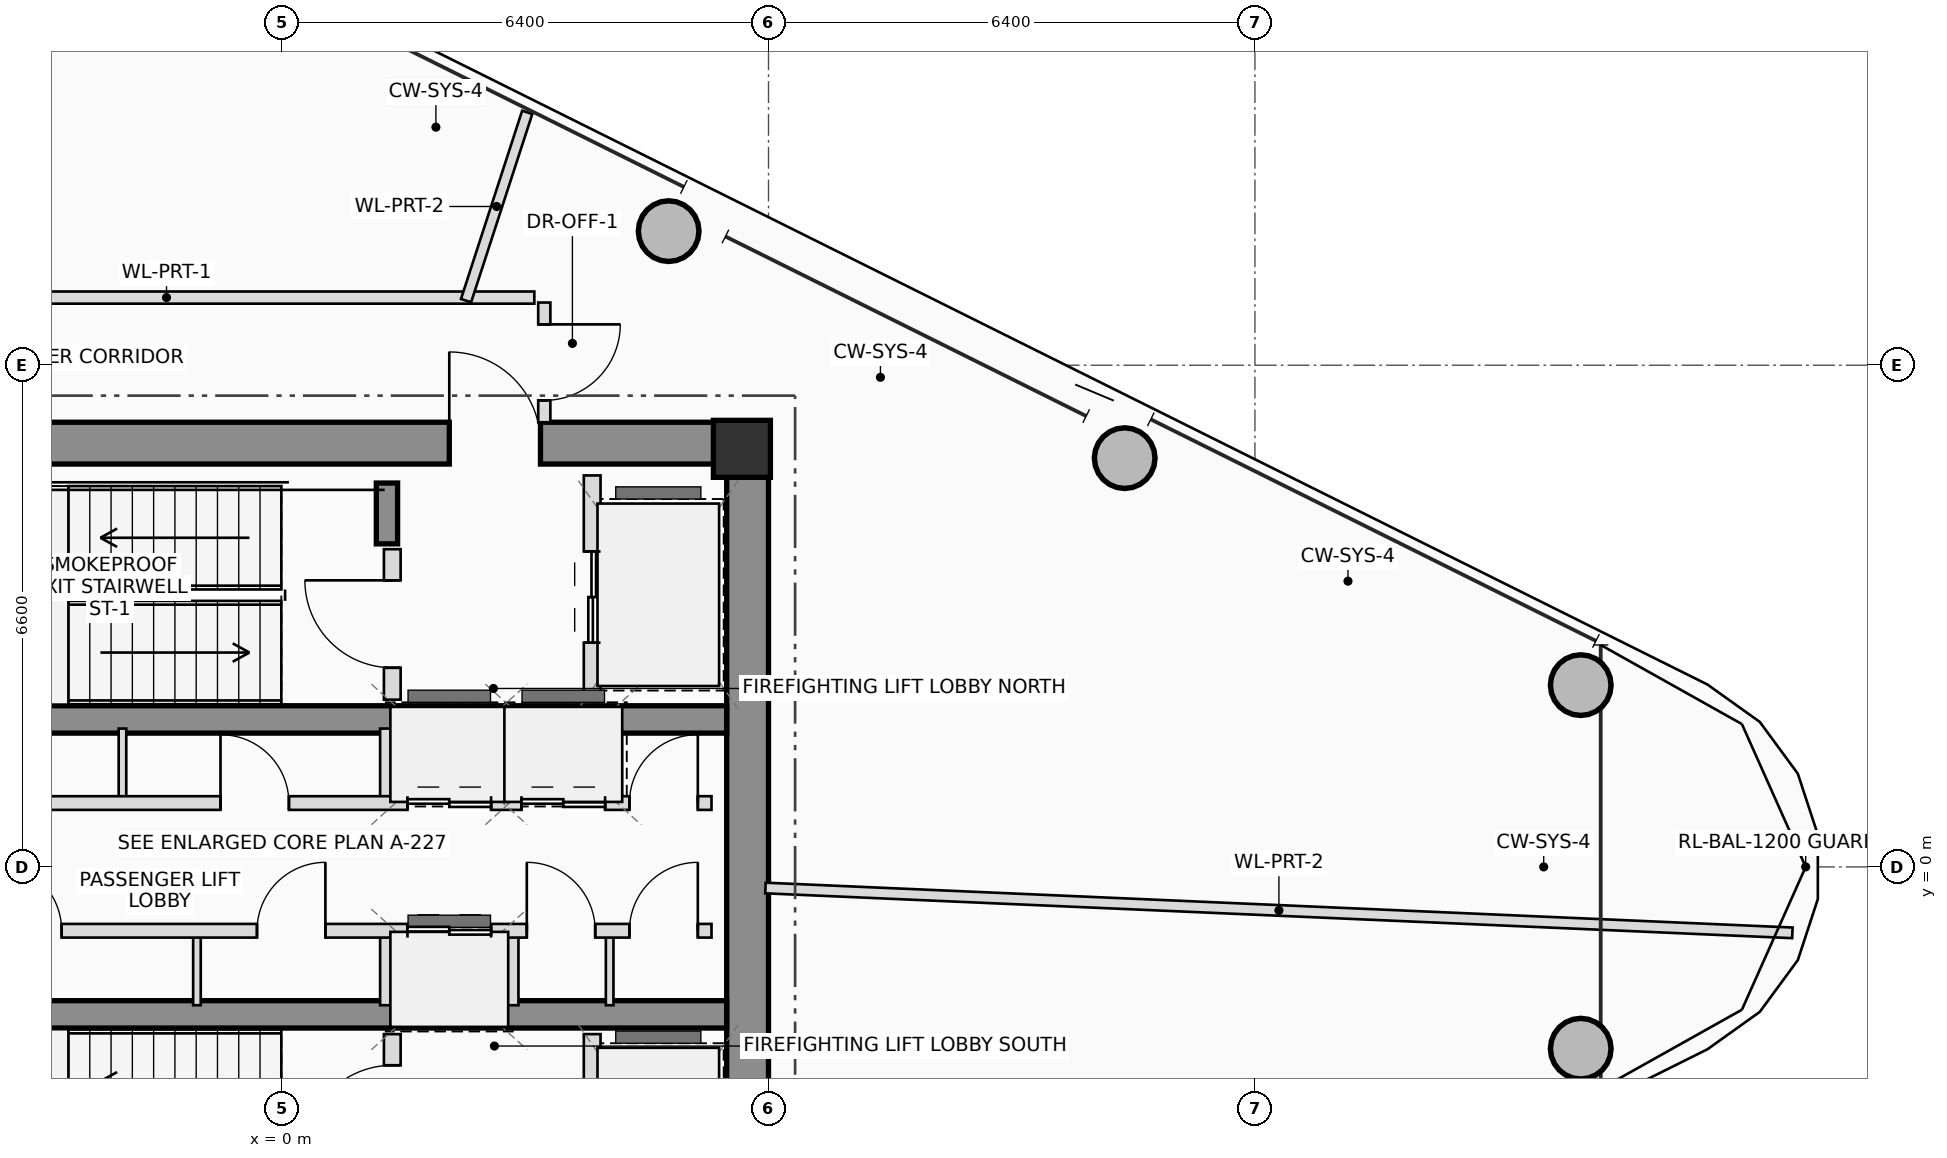
"""IFC4 building model, lengths in metres.
Left out: names, types, materials, properties, quantities, classifications, styles, units other than length and angle.
Written with IfcOpenShell. Run it as: python <this file> out.ifc"""

import sys

from ifc_helpers import new_model, si_unit, direction, frame, frame_2d, origin, origin_2d, place, context, subcontext, project, spatial, rectangle, hollow_circle, extrude, source, transform, mapped, element, fill, save


model = new_model("IFC4")
c1 = context("Model", 3, precision=1e-05, world=origin(), true_north=direction((0.0, 1.0)))
c2 = subcontext(c1, "Body", "Model", "MODEL_VIEW")
j1 = project(units=[si_unit("LENGTHUNIT", "METRE"), si_unit("PLANEANGLEUNIT", "RADIAN")], contexts=[c1])
p1 = place(None, origin())
s1 = spatial("IfcSite", under=j1, at=p1, CompositionType="ELEMENT")
p2 = place(p1, origin())
s2 = spatial("IfcBuilding", under=s1, at=p2, CompositionType="ELEMENT")
p3 = place(p2, frame((0.0, 0.0, 296.75)))
s3 = spatial("IfcBuildingStorey", under=s2, at=p3, CompositionType="ELEMENT", Elevation=296.75)
m1 = source(origin(), c2, "Body", "SweptSolid", [
    extrude(rectangle(XDim=0.75, YDim=0.75, at=origin_2d()), origin(), (0.0, 0.0, 1.0), 3.45),
])
p4 = place(p3, frame((6.05, 5.5, 0.0), z_axis=(0.0, 0.0, 1.0), x_axis=(1.0, 0.0, 0.0)))
e1 = element("IfcColumn", 1, at=p4, inside=s3, PredefinedType="COLUMN", context=c2, shape_type="MappedRepresentation", body=[
    mapped(m1, transform((0.0, 0.0, 0.0), scale=1.0)),
])
p5 = place(p3, frame((-6.4, 5.575, 0.0), z_axis=(0.0, 0.0, 1.0), x_axis=(1.0, 0.0, 0.0)))
e2 = element("IfcWall", 2, at=p5, inside=s3, PredefinedType="SHEAR", context=c2, shape_type="SweptSolid", body=[
    extrude(rectangle(XDim=12.8, YDim=0.55, at=frame_2d((6.4, 0.0))), origin(), (0.0, 0.0, 1.0), 3.45),
])
p6 = place(p5, frame((8.6, 0.0, 0.0)))
e3 = element("IfcOpeningElement", 3, at=p6, cuts=e2, PredefinedType="OPENING", context=c2, shape_type="SweptSolid", body=[
    extrude(rectangle(XDim=1.2, YDim=2.2, at=frame_2d((0.6, 1.1))), frame((0.0, 0.285, 0.0), z_axis=(0.0, -1.0, 0.0), x_axis=(1.0, 0.0, 0.0)), (0.0, 0.0, 1.0), 0.57),
])
p7 = place(p3, frame((6.125, -5.3, 0.0), z_axis=(0.0, 0.0, 1.0), x_axis=(0.0, 1.0, 0.0)))
e4 = element("IfcWall", 4, at=p7, inside=s3, PredefinedType="SHEAR", context=c2, shape_type="SweptSolid", body=[
    extrude(rectangle(XDim=10.6, YDim=0.55, at=frame_2d((5.3, 0.0))), origin(), (0.0, 0.0, 1.0), 3.45),
])
for number, where, z_axis, x_axis in (
    (5, (-5.85, 1.94, 0.0), (0.0, 0.0, 1.0), (1.0, 0.0, 0.0)),
    (6, (-5.85, -1.94, 0.0), (0.0, 0.0, 1.0), (1.0, 0.0, 0.0)),
):
    element("IfcWall", number, at=place(p3, frame(where, z_axis=z_axis, x_axis=x_axis)), inside=s3, PredefinedType="SHEAR", context=c2, shape_type="SweptSolid", body=[
        extrude(rectangle(XDim=11.7, YDim=0.36, at=frame_2d((5.85, 0.0))), origin(), (0.0, 0.0, 1.0), 3.45),
    ])
p8 = place(p3, frame((1.38, 4.25, 0.0), z_axis=(0.0, 0.0, 1.0), x_axis=(0.0, 1.0, 0.0)))
e7 = element("IfcWall", 7, at=p8, inside=s3, PredefinedType="SHEAR", context=c2, shape_type="SweptSolid", body=[
    extrude(rectangle(XDim=0.8, YDim=0.28, at=frame_2d((0.4, 0.0))), origin(), (0.0, 0.0, 1.0), 3.45),
])
m2 = source(origin(), c2, "Body", "SweptSolid", [
    extrude(hollow_circle(Radius=0.4, WallThickness=0.028, at=origin_2d()), origin(), (0.0, 0.0, 1.0), 3.45),
])
for number, where, z_axis, x_axis in (
    (8, (17.087, -2.392, 0.0), (0.0, 0.0, 1.0), (1.0, 0.0, 0.0)),
    (9, (17.087, 2.392, 0.0), (0.0, 0.0, 1.0), (1.0, 0.0, 0.0)),
    (10, (11.086, 5.378, 0.0), (0.0, 0.0, 1.0), (1.0, 0.0, 0.0)),
    (11, (5.086, 8.364, 0.0), (0.0, 0.0, 1.0), (1.0, 0.0, 0.0)),
):
    element("IfcColumn", number, at=place(p3, frame(where, z_axis=z_axis, x_axis=x_axis)), inside=s3, PredefinedType="COLUMN", context=c2, shape_type="MappedRepresentation", body=[
        mapped(m2, transform((0.0, 0.0, 0.0), scale=1.0)),
    ])
p9 = place(p3, frame((1.45, 2.2, 0.0), z_axis=(0.0, 0.0, 1.0), x_axis=(0.0, 1.0, 0.0)))
e12 = element("IfcWall", 12, at=p9, inside=s3, PredefinedType="PLUMBINGWALL", context=c2, shape_type="SweptSolid", body=[
    extrude(rectangle(XDim=1.98, YDim=0.22, at=frame_2d((0.99, 0.0))), origin(), (0.0, 0.0, 1.0), 3.25),
])
p10 = place(p9, frame((0.42, 0.0, 0.0)))
e13 = element("IfcOpeningElement", 13, at=p10, cuts=e12, PredefinedType="OPENING", context=c2, shape_type="SweptSolid", body=[
    extrude(rectangle(XDim=1.15, YDim=2.15, at=frame_2d((0.575, 1.075))), frame((0.0, 0.12, 0.0), z_axis=(0.0, -1.0, 0.0), x_axis=(1.0, 0.0, 0.0)), (0.0, 0.0, 1.0), 0.24),
])
p11 = place(p3, frame((4.08, 2.2, 0.0), z_axis=(0.0, 0.0, 1.0), x_axis=(0.0, 1.0, 0.0)))
e14 = element("IfcWall", 14, at=p11, inside=s3, PredefinedType="PLUMBINGWALL", context=c2, shape_type="SweptSolid", body=[
    extrude(rectangle(XDim=2.95, YDim=0.22, at=frame_2d((1.475, 0.0))), origin(), (0.0, 0.0, 1.0), 3.25),
])
p12 = place(p11, frame((0.75, 0.0, 0.0)))
e15 = element("IfcOpeningElement", 15, at=p12, cuts=e14, PredefinedType="OPENING", context=c2, shape_type="SweptSolid", body=[
    extrude(rectangle(XDim=1.2, YDim=2.25, at=frame_2d((0.6, 1.125))), frame((0.0, 0.12, 0.0), z_axis=(0.0, -1.0, 0.0), x_axis=(1.0, 0.0, 0.0)), (0.0, 0.0, 1.0), 0.24),
])
p13 = place(p3, frame((1.45, -4.18, 0.0), z_axis=(0.0, 0.0, 1.0), x_axis=(0.0, 1.0, 0.0)))
e16 = element("IfcWall", 16, at=p13, inside=s3, PredefinedType="PLUMBINGWALL", context=c2, shape_type="SweptSolid", body=[
    extrude(rectangle(XDim=1.98, YDim=0.22, at=frame_2d((0.99, 0.0))), origin(), (0.0, 0.0, 1.0), 3.25),
])
p14 = place(p13, frame((0.42, 0.0, 0.0)))
e17 = element("IfcOpeningElement", 17, at=p14, cuts=e16, PredefinedType="OPENING", context=c2, shape_type="SweptSolid", body=[
    extrude(rectangle(XDim=1.15, YDim=2.15, at=frame_2d((0.575, 1.075))), frame((0.0, 0.12, 0.0), z_axis=(0.0, -1.0, 0.0), x_axis=(1.0, 0.0, 0.0)), (0.0, 0.0, 1.0), 0.24),
])
p15 = place(p3, frame((4.08, -5.15, 0.0), z_axis=(0.0, 0.0, 1.0), x_axis=(0.0, 1.0, 0.0)))
e18 = element("IfcWall", 18, at=p15, inside=s3, PredefinedType="PLUMBINGWALL", context=c2, shape_type="SweptSolid", body=[
    extrude(rectangle(XDim=2.95, YDim=0.22, at=frame_2d((1.475, 0.0))), origin(), (0.0, 0.0, 1.0), 3.25),
])
p16 = place(p15, frame((0.95, 0.0, 0.0)))
e19 = element("IfcOpeningElement", 19, at=p16, cuts=e18, PredefinedType="OPENING", context=c2, shape_type="SweptSolid", body=[
    extrude(rectangle(XDim=1.2, YDim=2.25, at=frame_2d((0.6, 1.125))), frame((0.0, 0.12, 0.0), z_axis=(0.0, -1.0, 0.0), x_axis=(1.0, 0.0, 0.0)), (0.0, 0.0, 1.0), 0.24),
])
for number, where, z_axis, x_axis in (
    (20, (-2.1, 0.84, 0.0), (0.0, 0.0, 1.0), (0.0, 1.0, 0.0)),
    (21, (-1.12, -1.82, 0.0), (0.0, 0.0, 1.0), (0.0, 1.0, 0.0)),
):
    element("IfcWall", number, at=place(p3, frame(where, z_axis=z_axis, x_axis=x_axis)), inside=s3, PredefinedType="PARTITIONING", context=c2, shape_type="SweptSolid", body=[
        extrude(rectangle(XDim=0.98, YDim=0.1, at=frame_2d((0.49, 0.0))), origin(), (0.0, 0.0, 1.0), 3.25),
    ])
for number, where, z_axis, x_axis in (
    (22, (1.38, 0.84, 0.0), (0.0, 0.0, 1.0), (0.0, 1.0, 0.0)),
    (23, (1.38, -1.82, 0.0), (0.0, 0.0, 1.0), (0.0, 1.0, 0.0)),
    (24, (3.02, 0.84, 0.0), (0.0, 0.0, 1.0), (0.0, 1.0, 0.0)),
    (25, (4.38, 0.84, 0.0), (0.0, 0.0, 1.0), (0.0, 1.0, 0.0)),
    (26, (3.02, -1.82, 0.0), (0.0, 0.0, 1.0), (0.0, 1.0, 0.0)),
):
    element("IfcWall", number, at=place(p3, frame(where, z_axis=z_axis, x_axis=x_axis)), inside=s3, PredefinedType="PLUMBINGWALL", context=c2, shape_type="SweptSolid", body=[
        extrude(rectangle(XDim=0.98, YDim=0.18, at=frame_2d((0.49, 0.0))), origin(), (0.0, 0.0, 1.0), 3.25),
    ])
p17 = place(p3, frame((4.31, -1.82, 0.0), z_axis=(0.0, 0.0, 1.0), x_axis=(0.0, 1.0, 0.0)))
e27 = element("IfcWall", 27, at=p17, inside=s3, PredefinedType="PARTITIONING", context=c2, shape_type="SweptSolid", body=[
    extrude(rectangle(XDim=0.98, YDim=0.1, at=frame_2d((0.49, 0.0))), origin(), (0.0, 0.0, 1.0), 3.25),
])
p18 = place(p3, frame((-5.68, 0.84, 0.0), z_axis=(0.0, 0.0, 1.0), x_axis=(1.0, 0.0, 0.0)))
e28 = element("IfcWall", 28, at=p18, inside=s3, PredefinedType="PLUMBINGWALL", context=c2, shape_type="SweptSolid", body=[
    extrude(rectangle(XDim=11.33, YDim=0.18, at=frame_2d((5.665, 0.0))), origin(), (0.0, 0.0, 1.0), 3.25),
])
p19 = place(p18, frame((1.39, 0.0, 0.0)))
e29 = element("IfcOpeningElement", 29, at=p19, cuts=e28, PredefinedType="OPENING", context=c2, shape_type="SweptSolid", body=[
    extrude(rectangle(XDim=0.92, YDim=2.1, at=frame_2d((0.46, 1.05))), frame((0.0, 0.1, 0.0), z_axis=(0.0, -1.0, 0.0), x_axis=(1.0, 0.0, 0.0)), (0.0, 0.0, 1.0), 0.2),
])
p20 = place(p18, frame((4.87, 0.0, 0.0)))
e30 = element("IfcOpeningElement", 30, at=p20, cuts=e28, PredefinedType="OPENING", context=c2, shape_type="SweptSolid", body=[
    extrude(rectangle(XDim=0.9, YDim=2.05, at=frame_2d((0.45, 1.025))), frame((0.0, 0.1, 0.0), z_axis=(0.0, -1.0, 0.0), x_axis=(1.0, 0.0, 0.0)), (0.0, 0.0, 1.0), 0.2),
])
p21 = place(p18, frame((7.33, 0.0, 0.0)))
e31 = element("IfcOpeningElement", 31, at=p21, cuts=e28, PredefinedType="OPENING", context=c2, shape_type="SweptSolid", body=[
    extrude(rectangle(XDim=1.1, YDim=2.2, at=frame_2d((0.55, 1.1))), frame((0.0, 0.1, 0.0), z_axis=(0.0, -1.0, 0.0), x_axis=(1.0, 0.0, 0.0)), (0.0, 0.0, 1.0), 0.2),
])
p22 = place(p18, frame((8.83, 0.0, 0.0)))
e32 = element("IfcOpeningElement", 32, at=p22, cuts=e28, PredefinedType="OPENING", context=c2, shape_type="SweptSolid", body=[
    extrude(rectangle(XDim=1.1, YDim=2.2, at=frame_2d((0.55, 1.1))), frame((0.0, 0.1, 0.0), z_axis=(0.0, -1.0, 0.0), x_axis=(1.0, 0.0, 0.0)), (0.0, 0.0, 1.0), 0.2),
])
p23 = place(p18, frame((10.25, 0.0, 0.0)))
e33 = element("IfcOpeningElement", 33, at=p23, cuts=e28, PredefinedType="OPENING", context=c2, shape_type="SweptSolid", body=[
    extrude(rectangle(XDim=0.9, YDim=2.05, at=frame_2d((0.45, 1.025))), frame((0.0, 0.1, 0.0), z_axis=(0.0, -1.0, 0.0), x_axis=(1.0, 0.0, 0.0)), (0.0, 0.0, 1.0), 0.2),
])
p24 = place(p3, frame((-5.68, -0.84, 0.0), z_axis=(0.0, 0.0, 1.0), x_axis=(1.0, 0.0, 0.0)))
e34 = element("IfcWall", 34, at=p24, inside=s3, PredefinedType="PLUMBINGWALL", context=c2, shape_type="SweptSolid", body=[
    extrude(rectangle(XDim=11.33, YDim=0.18, at=frame_2d((5.665, 0.0))), origin(), (0.0, 0.0, 1.0), 3.25),
])
p25 = place(p24, frame((1.88, 0.0, 0.0)))
e35 = element("IfcOpeningElement", 35, at=p25, cuts=e34, PredefinedType="OPENING", context=c2, shape_type="SweptSolid", body=[
    extrude(rectangle(XDim=0.9, YDim=2.05, at=frame_2d((0.45, 1.025))), frame((0.0, 0.1, 0.0), z_axis=(0.0, -1.0, 0.0), x_axis=(1.0, 0.0, 0.0)), (0.0, 0.0, 1.0), 0.2),
])
p26 = place(p24, frame((5.35, 0.0, 0.0)))
e36 = element("IfcOpeningElement", 36, at=p26, cuts=e34, PredefinedType="OPENING", context=c2, shape_type="SweptSolid", body=[
    extrude(rectangle(XDim=0.9, YDim=2.05, at=frame_2d((0.45, 1.025))), frame((0.0, 0.1, 0.0), z_axis=(0.0, -1.0, 0.0), x_axis=(1.0, 0.0, 0.0)), (0.0, 0.0, 1.0), 0.2),
])
p27 = place(p24, frame((7.33, 0.0, 0.0)))
e37 = element("IfcOpeningElement", 37, at=p27, cuts=e34, PredefinedType="OPENING", context=c2, shape_type="SweptSolid", body=[
    extrude(rectangle(XDim=1.1, YDim=2.2, at=frame_2d((0.55, 1.1))), frame((0.0, 0.1, 0.0), z_axis=(0.0, -1.0, 0.0), x_axis=(1.0, 0.0, 0.0)), (0.0, 0.0, 1.0), 0.2),
])
p28 = place(p24, frame((8.9, 0.0, 0.0)))
e38 = element("IfcOpeningElement", 38, at=p28, cuts=e34, PredefinedType="OPENING", context=c2, shape_type="SweptSolid", body=[
    extrude(rectangle(XDim=0.9, YDim=2.05, at=frame_2d((0.45, 1.025))), frame((0.0, 0.1, 0.0), z_axis=(0.0, -1.0, 0.0), x_axis=(1.0, 0.0, 0.0)), (0.0, 0.0, 1.0), 0.2),
])
p29 = place(p24, frame((10.25, 0.0, 0.0)))
e39 = element("IfcOpeningElement", 39, at=p29, cuts=e34, PredefinedType="OPENING", context=c2, shape_type="SweptSolid", body=[
    extrude(rectangle(XDim=0.9, YDim=2.05, at=frame_2d((0.45, 1.025))), frame((0.0, 0.1, 0.0), z_axis=(0.0, -1.0, 0.0), x_axis=(1.0, 0.0, 0.0)), (0.0, 0.0, 1.0), 0.2),
])
p30 = place(p3, frame((-6.36, 7.49, 0.0), z_axis=(0.0, 0.0, 1.0), x_axis=(1.0, 0.0, 0.0)))
e40 = element("IfcWall", 40, at=p30, inside=s3, PredefinedType="PARTITIONING", context=c2, shape_type="SweptSolid", body=[
    extrude(rectangle(XDim=9.679, YDim=0.16, at=frame_2d((4.84, 0.0))), origin(), (0.0, 0.0, 1.0), 2.655),
])
p31 = place(p3, frame((3.45, 7.425, 0.0), z_axis=(0.0, 0.0, 1.0), x_axis=(0.0, -1.0, 0.0)))
e41 = element("IfcWall", 41, at=p31, inside=s3, PredefinedType="PARTITIONING", context=c2, shape_type="SweptSolid", body=[
    extrude(rectangle(XDim=1.575, YDim=0.16, at=frame_2d((0.787, 0.0))), origin(), (0.0, 0.0, 1.0), 2.855),
])
p32 = place(p31, frame((0.287, 0.0, 0.0)))
e42 = element("IfcOpeningElement", 42, at=p32, cuts=e41, PredefinedType="OPENING", context=c2, shape_type="SweptSolid", body=[
    extrude(rectangle(XDim=1.0, YDim=2.25, at=frame_2d((0.5, 1.125))), frame((0.0, 0.09, 0.0), z_axis=(0.0, -1.0, 0.0), x_axis=(1.0, 0.0, 0.0)), (0.0, 0.0, 1.0), 0.18),
])
p33 = place(p3, frame((6.36, -0.278, 0.0), z_axis=(0.0, 0.0, 1.0), x_axis=(0.999047623791, -0.043633076864, 0.0)))
e43 = element("IfcWall", 43, at=p33, inside=s3, PredefinedType="PARTITIONING", context=c2, shape_type="SweptSolid", body=[
    extrude(rectangle(XDim=13.524, YDim=0.14, at=frame_2d((6.762, 0.0))), origin(), (0.0, 0.0, 1.0), 2.815),
])
p34 = place(p3, frame((2.421, 7.45, 0.0), z_axis=(0.0, 0.0, 1.0), x_axis=(0.309047920595, 0.951046467201, 0.0)))
e44 = element("IfcWall", 44, at=p34, inside=s3, PredefinedType="PARTITIONING", context=c2, shape_type="SweptSolid", body=[
    extrude(rectangle(XDim=2.604, YDim=0.14, at=frame_2d((1.302, 0.0))), origin(), (0.0, 0.0, 1.0), 2.815),
])
p35 = place(p6, origin())
e45 = element("IfcDoor", 45, at=p35, inside=s3, OperationType="SINGLE_SWING_LEFT", PredefinedType="DOOR", context=c2, shape_type="SweptSolid", body=[
    extrude(rectangle(XDim=1.2, YDim=2.2, at=frame_2d((0.6, 1.1))), frame((0.0, 0.025, 0.0), z_axis=(0.0, -1.0, 0.0), x_axis=(1.0, 0.0, 0.0)), (0.0, 0.0, 1.0), 0.05),
])
fill(e3, e45)
p36 = place(p10, origin())
e46 = element("IfcDoor", 46, at=p36, inside=s3, OperationType="SINGLE_SWING_RIGHT", PredefinedType="DOOR", context=c2, shape_type="SweptSolid", body=[
    extrude(rectangle(XDim=1.15, YDim=2.15, at=frame_2d((0.575, 1.075))), frame((0.0, 0.025, 0.0), z_axis=(0.0, -1.0, 0.0), x_axis=(1.0, 0.0, 0.0)), (0.0, 0.0, 1.0), 0.05),
])
fill(e13, e46)
p37 = place(p12, origin())
e47 = element("IfcDoor", 47, at=p37, inside=s3, OperationType="DOUBLE_DOOR_SLIDING", PredefinedType="DOOR", context=c2, shape_type="SweptSolid", body=[
    extrude(rectangle(XDim=1.2, YDim=2.25, at=frame_2d((0.6, 1.125))), frame((0.0, 0.025, 0.0), z_axis=(0.0, -1.0, 0.0), x_axis=(1.0, 0.0, 0.0)), (0.0, 0.0, 1.0), 0.05),
])
fill(e15, e47)
p38 = place(p14, origin())
e48 = element("IfcDoor", 48, at=p38, inside=s3, OperationType="SINGLE_SWING_LEFT", PredefinedType="DOOR", context=c2, shape_type="SweptSolid", body=[
    extrude(rectangle(XDim=1.15, YDim=2.15, at=frame_2d((0.575, 1.075))), frame((0.0, 0.025, 0.0), z_axis=(0.0, -1.0, 0.0), x_axis=(1.0, 0.0, 0.0)), (0.0, 0.0, 1.0), 0.05),
])
fill(e17, e48)
p39 = place(p20, origin())
e49 = element("IfcDoor", 49, at=p39, inside=s3, OperationType="SINGLE_SWING_LEFT", PredefinedType="DOOR", context=c2, shape_type="SweptSolid", body=[
    extrude(rectangle(XDim=0.9, YDim=2.05, at=frame_2d((0.45, 1.025))), frame((0.0, 0.025, 0.0), z_axis=(0.0, -1.0, 0.0), x_axis=(1.0, 0.0, 0.0)), (0.0, 0.0, 1.0), 0.05),
])
fill(e30, e49)
p40 = place(p21, origin())
e50 = element("IfcDoor", 50, at=p40, inside=s3, OperationType="DOUBLE_DOOR_SLIDING", PredefinedType="DOOR", context=c2, shape_type="SweptSolid", body=[
    extrude(rectangle(XDim=1.1, YDim=2.2, at=frame_2d((0.55, 1.1))), frame((0.0, 0.025, 0.0), z_axis=(0.0, -1.0, 0.0), x_axis=(1.0, 0.0, 0.0)), (0.0, 0.0, 1.0), 0.05),
])
fill(e31, e50)
p41 = place(p22, origin())
e51 = element("IfcDoor", 51, at=p41, inside=s3, OperationType="DOUBLE_DOOR_SLIDING", PredefinedType="DOOR", context=c2, shape_type="SweptSolid", body=[
    extrude(rectangle(XDim=1.1, YDim=2.2, at=frame_2d((0.55, 1.1))), frame((0.0, 0.025, 0.0), z_axis=(0.0, -1.0, 0.0), x_axis=(1.0, 0.0, 0.0)), (0.0, 0.0, 1.0), 0.05),
])
fill(e32, e51)
p42 = place(p23, origin())
e52 = element("IfcDoor", 52, at=p42, inside=s3, OperationType="SINGLE_SWING_RIGHT", PredefinedType="DOOR", context=c2, shape_type="SweptSolid", body=[
    extrude(rectangle(XDim=0.9, YDim=2.05, at=frame_2d((0.45, 1.025))), frame((0.0, 0.025, 0.0), z_axis=(0.0, -1.0, 0.0), x_axis=(1.0, 0.0, 0.0)), (0.0, 0.0, 1.0), 0.05),
])
fill(e33, e52)
p43 = place(p25, origin())
e53 = element("IfcDoor", 53, at=p43, inside=s3, OperationType="SINGLE_SWING_LEFT", PredefinedType="DOOR", context=c2, shape_type="SweptSolid", body=[
    extrude(rectangle(XDim=0.9, YDim=2.05, at=frame_2d((0.45, 1.025))), frame((0.0, 0.025, 0.0), z_axis=(0.0, -1.0, 0.0), x_axis=(1.0, 0.0, 0.0)), (0.0, 0.0, 1.0), 0.05),
])
fill(e35, e53)
p44 = place(p26, origin())
e54 = element("IfcDoor", 54, at=p44, inside=s3, OperationType="SINGLE_SWING_RIGHT", PredefinedType="DOOR", context=c2, shape_type="SweptSolid", body=[
    extrude(rectangle(XDim=0.9, YDim=2.05, at=frame_2d((0.45, 1.025))), frame((0.0, 0.025, 0.0), z_axis=(0.0, -1.0, 0.0), x_axis=(1.0, 0.0, 0.0)), (0.0, 0.0, 1.0), 0.05),
])
fill(e36, e54)
p45 = place(p27, origin())
e55 = element("IfcDoor", 55, at=p45, inside=s3, OperationType="DOUBLE_DOOR_SLIDING", PredefinedType="DOOR", context=c2, shape_type="SweptSolid", body=[
    extrude(rectangle(XDim=1.1, YDim=2.2, at=frame_2d((0.55, 1.1))), frame((0.0, 0.025, 0.0), z_axis=(0.0, -1.0, 0.0), x_axis=(1.0, 0.0, 0.0)), (0.0, 0.0, 1.0), 0.05),
])
fill(e37, e55)
p46 = place(p28, origin())
e56 = element("IfcDoor", 56, at=p46, inside=s3, OperationType="SINGLE_SWING_LEFT", PredefinedType="DOOR", context=c2, shape_type="SweptSolid", body=[
    extrude(rectangle(XDim=0.9, YDim=2.05, at=frame_2d((0.45, 1.025))), frame((0.0, 0.025, 0.0), z_axis=(0.0, -1.0, 0.0), x_axis=(1.0, 0.0, 0.0)), (0.0, 0.0, 1.0), 0.05),
])
fill(e38, e56)
p47 = place(p29, origin())
e57 = element("IfcDoor", 57, at=p47, inside=s3, OperationType="SINGLE_SWING_RIGHT", PredefinedType="DOOR", context=c2, shape_type="SweptSolid", body=[
    extrude(rectangle(XDim=0.9, YDim=2.05, at=frame_2d((0.45, 1.025))), frame((0.0, 0.025, 0.0), z_axis=(0.0, -1.0, 0.0), x_axis=(1.0, 0.0, 0.0)), (0.0, 0.0, 1.0), 0.05),
])
fill(e39, e57)
p48 = place(p32, origin())
e58 = element("IfcDoor", 58, at=p48, inside=s3, OperationType="SINGLE_SWING_LEFT", PredefinedType="DOOR", context=c2, shape_type="SweptSolid", body=[
    extrude(rectangle(XDim=1.0, YDim=2.25, at=frame_2d((0.5, 1.125))), frame((0.0, 0.025, 0.0), z_axis=(0.0, -1.0, 0.0), x_axis=(1.0, 0.0, 0.0)), (0.0, 0.0, 1.0), 0.05),
])
fill(e42, e58)
save(model, sys.argv[1])
